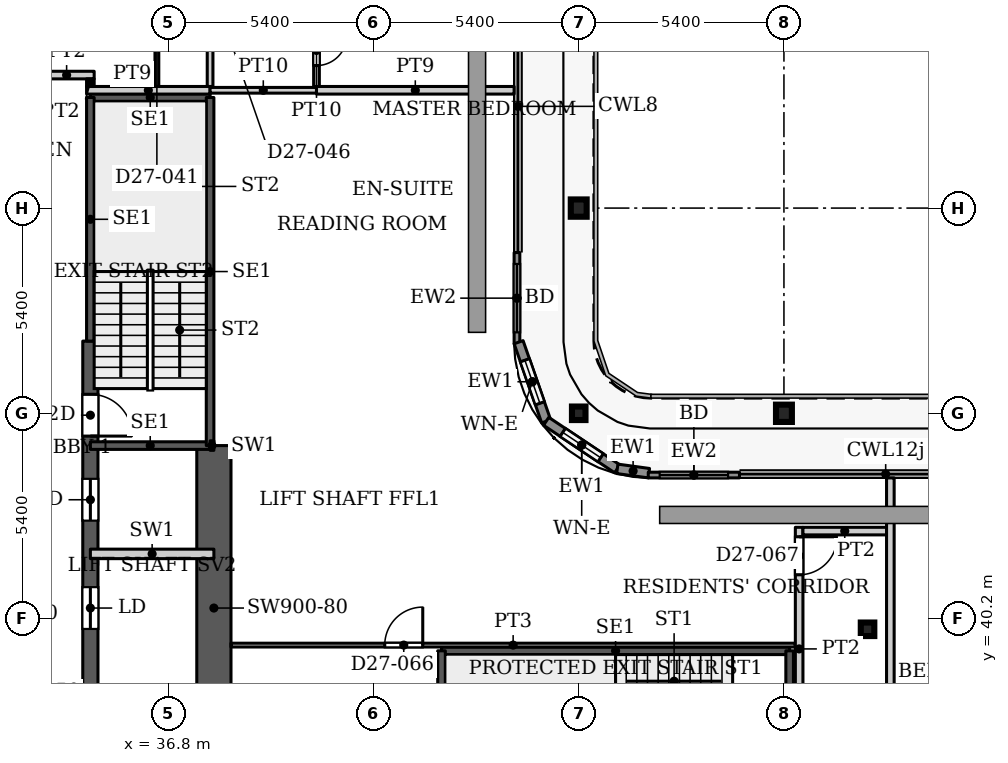
"""IFC4 building model, lengths in metres.
Left out: names, types, materials, properties, quantities, classifications, styles, units other than length and angle.
Written with IfcOpenShell. Run it as: python <this file> out.ifc"""

import sys

from ifc_helpers import new_model, si_unit, direction, frame, frame_2d, origin, origin_2d, place, context, subcontext, project, spatial, rectangle, hollow_rectangle, i_section, extrude, source, transform, mapped, element, fill, save


model = new_model("IFC4")
c1 = context("Model", 3, precision=1e-05, world=origin(), true_north=direction((0.0, 1.0)))
c2 = subcontext(c1, "Body", "Model", "MODEL_VIEW")
j1 = project(units=[si_unit("LENGTHUNIT", "METRE"), si_unit("PLANEANGLEUNIT", "RADIAN")], contexts=[c1])
p1 = place(None, origin())
s1 = spatial("IfcSite", under=j1, at=p1, CompositionType="ELEMENT")
p2 = place(p1, origin())
s2 = spatial("IfcBuilding", under=s1, at=p2, CompositionType="ELEMENT")
p3 = place(p2, frame((0.0, 0.0, 117.5)))
s3 = spatial("IfcBuildingStorey", under=s2, at=p3, CompositionType="ELEMENT", Elevation=117.5)
for number, where, z_axis, x_axis in (
    (1, (53.0, 45.6, 0.0), (0.0, 0.0, 1.0), (1.0, 0.0, 0.0)),
    (2, (47.6, 51.0, 0.0), (0.0, 0.0, 1.0), (1.0, 0.0, 0.0)),
):
    element("IfcColumn", number, at=place(p3, frame(where, z_axis=z_axis, x_axis=x_axis)), inside=s3, PredefinedType="COLUMN", context=c2, shape_type="SweptSolid", body=[
        extrude(i_section(OverallWidth=0.418, OverallDepth=0.455, WebThickness=0.042, FlangeThickness=0.068, FilletRadius=0.014, at=origin_2d()), origin(), (0.0, 0.0, 1.0), 3.9),
    ])
for number, where, z_axis, x_axis in (
    (3, (55.2, 39.916, 0.0), (0.0, 0.0, 1.0), (1.0, 0.0, 0.0)),
    (4, (47.6, 45.6, 0.0), (0.0, 0.0, 1.0), (1.0, 0.0, 0.0)),
):
    element("IfcColumn", number, at=place(p3, frame(where, z_axis=z_axis, x_axis=x_axis)), inside=s3, PredefinedType="COLUMN", context=c2, shape_type="SweptSolid", body=[
        extrude(hollow_rectangle(XDim=0.356, YDim=0.356, WallThickness=0.016, InnerFilletRadius=0.016, OuterFilletRadius=0.032, at=origin_2d()), origin(), (0.0, 0.0, 1.0), 3.9),
    ])
p4 = place(p3, frame((34.75, 29.05, 0.0), z_axis=(0.0, 0.0, 1.0), x_axis=(0.0, 1.0, 0.0)))
e5 = element("IfcWall", 5, at=p4, inside=s3, PredefinedType="SHEAR", context=c2, shape_type="SweptSolid", body=[
    extrude(rectangle(XDim=18.45, YDim=0.4, at=frame_2d((9.225, 0.0))), origin(), (0.0, 0.0, 1.0), 3.9),
])
p5 = place(p4, frame((8.025, 0.0, 0.0)))
e6 = element("IfcOpeningElement", 6, at=p5, cuts=e5, PredefinedType="OPENING", context=c2, shape_type="SweptSolid", body=[
    extrude(rectangle(XDim=1.1, YDim=2.2, at=frame_2d((0.55, 1.1))), frame((0.0, 0.21, 0.0), z_axis=(0.0, -1.0, 0.0), x_axis=(1.0, 0.0, 0.0)), (0.0, 0.0, 1.0), 0.42),
])
p6 = place(p4, frame((10.875, 0.0, 0.0)))
e7 = element("IfcOpeningElement", 7, at=p6, cuts=e5, PredefinedType="OPENING", context=c2, shape_type="SweptSolid", body=[
    extrude(rectangle(XDim=1.1, YDim=2.2, at=frame_2d((0.55, 1.1))), frame((0.0, 0.21, 0.0), z_axis=(0.0, -1.0, 0.0), x_axis=(1.0, 0.0, 0.0)), (0.0, 0.0, 1.0), 0.42),
])
p7 = place(p4, frame((13.725, 0.0, 0.0)))
e8 = element("IfcOpeningElement", 8, at=p7, cuts=e5, PredefinedType="OPENING", context=c2, shape_type="SweptSolid", body=[
    extrude(rectangle(XDim=1.1, YDim=2.2, at=frame_2d((0.55, 1.1))), frame((0.0, 0.21, 0.0), z_axis=(0.0, -1.0, 0.0), x_axis=(1.0, 0.0, 0.0)), (0.0, 0.0, 1.0), 0.42),
])
p8 = place(p4, frame((15.95, 0.0, 0.0)))
e9 = element("IfcOpeningElement", 9, at=p8, cuts=e5, PredefinedType="OPENING", context=c2, shape_type="SweptSolid", body=[
    extrude(rectangle(XDim=1.1, YDim=2.2, at=frame_2d((0.55, 1.1))), frame((0.0, 0.21, 0.0), z_axis=(0.0, -1.0, 0.0), x_axis=(1.0, 0.0, 0.0)), (0.0, 0.0, 1.0), 0.42),
])
p9 = place(p3, frame((38.0, 36.2, 0.0), z_axis=(0.0, 0.0, 1.0), x_axis=(0.0, 1.0, 0.0)))
e10 = element("IfcWall", 10, at=p9, inside=s3, PredefinedType="SHEAR", context=c2, shape_type="SweptSolid", body=[
    extrude(rectangle(XDim=8.55, YDim=0.9, at=frame_2d((4.275, 0.0))), origin(), (0.0, 0.0, 1.0), 3.9),
])
p10 = place(p3, frame((45.975, 49.83, 0.0), z_axis=(0.0, 0.0, 1.0), x_axis=(0.0, -1.0, 0.0)))
e11 = element("IfcWall", 11, at=p10, inside=s3, PredefinedType="SOLIDWALL", context=c2, shape_type="SweptSolid", body=[
    extrude(rectangle(XDim=2.4, YDim=0.15, at=frame_2d((1.2, 0.0))), origin(), (0.0, 0.0, 1.0), 3.75),
])
p11 = place(p10, frame((0.3, 0.0, 0.0)))
e12 = element("IfcOpeningElement", 12, at=p11, cuts=e11, PredefinedType="OPENING", context=c2, shape_type="SweptSolid", body=[
    extrude(rectangle(XDim=1.8, YDim=2.4, at=frame_2d((0.9, 1.2))), frame((0.0, 0.085, 0.0), z_axis=(0.0, -1.0, 0.0), x_axis=(1.0, 0.0, 0.0)), (0.0, 0.0, 1.0), 0.17),
])
p12 = place(p3, frame((46.018, 47.471, 0.0), z_axis=(0.0, 0.0, 1.0), x_axis=(0.328791208903, -0.944402637093, 0.0)))
e13 = element("IfcWall", 13, at=p12, inside=s3, PredefinedType="SOLIDWALL", context=c2, shape_type="SweptSolid", body=[
    extrude(rectangle(XDim=2.205, YDim=0.25, at=frame_2d((1.102, 0.0))), origin(), (0.0, 0.0, 1.0), 3.75),
])
p13 = place(p12, frame((0.503, 0.0, 0.6)))
e14 = element("IfcOpeningElement", 14, at=p13, cuts=e13, PredefinedType="OPENING", context=c2, shape_type="SweptSolid", body=[
    extrude(rectangle(XDim=1.2, YDim=2.1, at=frame_2d((0.6, 1.05))), frame((0.0, 0.135, 0.0), z_axis=(0.0, -1.0, 0.0), x_axis=(1.0, 0.0, 0.0)), (0.0, 0.0, 1.0), 0.27),
])
p14 = place(p3, frame((46.743, 45.389, 0.0), z_axis=(0.0, 0.0, 1.0), x_axis=(0.831449265529, -0.555600682912, 0.0)))
e15 = element("IfcWall", 15, at=p14, inside=s3, PredefinedType="SOLIDWALL", context=c2, shape_type="SweptSolid", body=[
    extrude(rectangle(XDim=2.251, YDim=0.25, at=frame_2d((1.126, 0.0))), origin(), (0.0, 0.0, 1.0), 3.75),
])
p15 = place(p14, frame((0.525, 0.0, 0.6)))
e16 = element("IfcOpeningElement", 16, at=p15, cuts=e15, PredefinedType="OPENING", context=c2, shape_type="SweptSolid", body=[
    extrude(rectangle(XDim=1.2, YDim=2.1, at=frame_2d((0.6, 1.05))), frame((0.0, 0.135, 0.0), z_axis=(0.0, -1.0, 0.0), x_axis=(1.0, 0.0, 0.0)), (0.0, 0.0, 1.0), 0.27),
])
p16 = place(p3, frame((48.615, 44.138, 0.0), z_axis=(0.0, 0.0, 1.0), x_axis=(0.990741504246, -0.135761819977, 0.0)))
e17 = element("IfcWall", 17, at=p16, inside=s3, PredefinedType="SOLIDWALL", context=c2, shape_type="SweptSolid", body=[
    extrude(rectangle(XDim=0.84, YDim=0.25, at=frame_2d((0.42, 0.0))), origin(), (0.0, 0.0, 1.0), 3.75),
])
p17 = place(p3, frame((49.43, 43.975, 0.0), z_axis=(0.0, 0.0, 1.0), x_axis=(1.0, 0.0, 0.0)))
e18 = element("IfcWall", 18, at=p17, inside=s3, PredefinedType="SOLIDWALL", context=c2, shape_type="SweptSolid", body=[
    extrude(rectangle(XDim=2.4, YDim=0.15, at=frame_2d((1.2, 0.0))), origin(), (0.0, 0.0, 1.0), 3.75),
])
p18 = place(p17, frame((0.3, 0.0, 0.0)))
e19 = element("IfcOpeningElement", 19, at=p18, cuts=e18, PredefinedType="OPENING", context=c2, shape_type="SweptSolid", body=[
    extrude(rectangle(XDim=1.8, YDim=2.4, at=frame_2d((0.9, 1.2))), frame((0.0, 0.085, 0.0), z_axis=(0.0, -1.0, 0.0), x_axis=(1.0, 0.0, 0.0)), (0.0, 0.0, 1.0), 0.17),
])
p19 = place(p3, frame((43.99, 39.35, 0.0), z_axis=(0.0, 0.0, 1.0), x_axis=(1.0, 0.0, 0.0)))
e20 = element("IfcWall", 20, at=p19, inside=s3, PredefinedType="SHEAR", context=c2, shape_type="SweptSolid", body=[
    extrude(rectangle(XDim=9.16, YDim=0.2, at=frame_2d((4.58, 0.0))), origin(), (0.0, 0.0, 1.0), 3.9),
])
for number, where, z_axis, x_axis in (
    (21, (43.99, 36.2, 0.0), (0.0, 0.0, 1.0), (0.0, 1.0, 0.0)),
    (22, (53.15, 36.2, 0.0), (0.0, 0.0, 1.0), (0.0, 1.0, 0.0)),
):
    element("IfcWall", number, at=place(p3, frame(where, z_axis=z_axis, x_axis=x_axis)), inside=s3, PredefinedType="SHEAR", context=c2, shape_type="SweptSolid", body=[
        extrude(rectangle(XDim=3.15, YDim=0.2, at=frame_2d((1.575, 0.0))), origin(), (0.0, 0.0, 1.0), 3.9),
    ])
for number, where, z_axis, x_axis in (
    (23, (34.75, 44.75, 0.0), (0.0, 0.0, 1.0), (1.0, 0.0, 0.0)),
    (24, (34.75, 53.91, 0.0), (0.0, 0.0, 1.0), (1.0, 0.0, 0.0)),
):
    element("IfcWall", number, at=place(p3, frame(where, z_axis=z_axis, x_axis=x_axis)), inside=s3, PredefinedType="SHEAR", context=c2, shape_type="SweptSolid", body=[
        extrude(rectangle(XDim=3.15, YDim=0.2, at=frame_2d((1.575, 0.0))), origin(), (0.0, 0.0, 1.0), 3.9),
    ])
p20 = place(p3, frame((34.75, 47.5, 0.0), z_axis=(0.0, 0.0, 1.0), x_axis=(0.0, 1.0, 0.0)))
e25 = element("IfcWall", 25, at=p20, inside=s3, PredefinedType="SHEAR", context=c2, shape_type="SweptSolid", body=[
    extrude(rectangle(XDim=6.41, YDim=0.2, at=frame_2d((3.205, 0.0))), origin(), (0.0, 0.0, 1.0), 3.9),
])
p21 = place(p3, frame((37.9, 44.75, 0.0), z_axis=(0.0, 0.0, 1.0), x_axis=(0.0, 1.0, 0.0)))
e26 = element("IfcWall", 26, at=p21, inside=s3, PredefinedType="SHEAR", context=c2, shape_type="SweptSolid", body=[
    extrude(rectangle(XDim=9.16, YDim=0.2, at=frame_2d((4.58, 0.0))), origin(), (0.0, 0.0, 1.0), 3.9),
])
p22 = place(p3, frame((34.75, 41.9, 0.0), z_axis=(0.0, 0.0, 1.0), x_axis=(1.0, 0.0, 0.0)))
e27 = element("IfcWall", 27, at=p22, inside=s3, PredefinedType="PARTITIONING", context=c2, shape_type="SweptSolid", body=[
    extrude(rectangle(XDim=3.25, YDim=0.25, at=frame_2d((1.625, 0.0))), origin(), (0.0, 0.0, 1.0), 3.9),
])
p23 = place(p3, frame((37.9, 44.75, 0.0), z_axis=(0.0, 0.0, 1.0), x_axis=(1.0, 0.0, 0.0)))
e28 = element("IfcWall", 28, at=p23, inside=s3, PredefinedType="PARTITIONING", context=c2, shape_type="SweptSolid", body=[
    extrude(rectangle(XDim=0.1, YDim=0.25, at=frame_2d((0.05, 0.0))), origin(), (0.0, 0.0, 1.0), 3.9),
])
p24 = place(p3, frame((33.4, 54.5, 0.0), z_axis=(0.0, 0.0, 1.0), x_axis=(1.0, 0.0, 0.0)))
e29 = element("IfcWall", 29, at=p24, inside=s3, PredefinedType="PARTITIONING", context=c2, shape_type="SweptSolid", body=[
    extrude(rectangle(XDim=1.45, YDim=0.2, at=frame_2d((0.725, 0.0))), origin(), (0.0, 0.0, 1.0), 3.6),
])
p25 = place(p3, frame((34.65, 54.1, 0.0), z_axis=(0.0, 0.0, 1.0), x_axis=(1.0, 0.0, 0.0)))
e30 = element("IfcWall", 30, at=p25, inside=s3, PredefinedType="PARTITIONING", context=c2, shape_type="SweptSolid", body=[
    extrude(rectangle(XDim=3.25, YDim=0.2, at=frame_2d((1.625, 0.0))), origin(), (0.0, 0.0, 1.0), 3.6),
])
p26 = place(p3, frame((34.75, 54.2, 0.0), z_axis=(0.0, 0.0, 1.0), x_axis=(0.0, 1.0, 0.0)))
e31 = element("IfcWall", 31, at=p26, inside=s3, PredefinedType="PARTITIONING", context=c2, shape_type="SweptSolid", body=[
    extrude(rectangle(XDim=0.2, YDim=0.2, at=frame_2d((0.1, 0.0))), origin(), (0.0, 0.0, 1.0), 3.6),
])
p27 = place(p3, frame((36.5, 54.2, 0.0), z_axis=(0.0, 0.0, 1.0), x_axis=(0.0, 1.0, 0.0)))
e32 = element("IfcWall", 32, at=p27, inside=s3, PredefinedType="PARTITIONING", context=c2, shape_type="SweptSolid", body=[
    extrude(rectangle(XDim=2.85, YDim=0.1, at=frame_2d((1.425, 0.0))), origin(), (0.0, 0.0, 1.0), 3.6),
])
p28 = place(p27, frame((0.95, 0.0, 0.0)))
e33 = element("IfcOpeningElement", 33, at=p28, cuts=e32, PredefinedType="OPENING", context=c2, shape_type="SweptSolid", body=[
    extrude(rectangle(XDim=0.9, YDim=2.1, at=frame_2d((0.45, 1.05))), frame((0.0, 0.06, 0.0), z_axis=(0.0, -1.0, 0.0), x_axis=(1.0, 0.0, 0.0)), (0.0, 0.0, 1.0), 0.12),
])
p29 = place(p3, frame((37.9, 54.1, 0.0), z_axis=(0.0, 0.0, 1.0), x_axis=(1.0, 0.0, 0.0)))
e34 = element("IfcWall", 34, at=p29, inside=s3, PredefinedType="PARTITIONING", context=c2, shape_type="SweptSolid", body=[
    extrude(rectangle(XDim=2.8, YDim=0.15, at=frame_2d((1.4, 0.0))), origin(), (0.0, 0.0, 1.0), 3.6),
])
p30 = place(p3, frame((37.9, 54.2, 0.0), z_axis=(0.0, 0.0, 1.0), x_axis=(0.0, 1.0, 0.0)))
e35 = element("IfcWall", 35, at=p30, inside=s3, PredefinedType="PARTITIONING", context=c2, shape_type="SweptSolid", body=[
    extrude(rectangle(XDim=14.2, YDim=0.15, at=frame_2d((7.1, 0.0))), origin(), (0.0, 0.0, 1.0), 3.6),
])
p31 = place(p30, frame((4.4, 0.0, 0.0)))
e36 = element("IfcOpeningElement", 36, at=p31, cuts=e35, PredefinedType="OPENING", context=c2, shape_type="SweptSolid", body=[
    extrude(rectangle(XDim=0.9, YDim=2.1, at=frame_2d((0.45, 1.05))), frame((0.0, 0.085, 0.0), z_axis=(0.0, -1.0, 0.0), x_axis=(1.0, 0.0, 0.0)), (0.0, 0.0, 1.0), 0.17),
])
p32 = place(p30, frame((9.5, 0.0, 0.0)))
e37 = element("IfcOpeningElement", 37, at=p32, cuts=e35, PredefinedType="OPENING", context=c2, shape_type="SweptSolid", body=[
    extrude(rectangle(XDim=0.9, YDim=2.1, at=frame_2d((0.45, 1.05))), frame((0.0, 0.085, 0.0), z_axis=(0.0, -1.0, 0.0), x_axis=(1.0, 0.0, 0.0)), (0.0, 0.0, 1.0), 0.17),
])
p33 = place(p30, frame((12.3, 0.0, 0.0)))
e38 = element("IfcOpeningElement", 38, at=p33, cuts=e35, PredefinedType="OPENING", context=c2, shape_type="SweptSolid", body=[
    extrude(rectangle(XDim=1.0, YDim=2.1, at=frame_2d((0.5, 1.05))), frame((0.0, 0.085, 0.0), z_axis=(0.0, -1.0, 0.0), x_axis=(1.0, 0.0, 0.0)), (0.0, 0.0, 1.0), 0.17),
])
p34 = place(p30, frame((6.95, 0.0, 0.0)))
e39 = element("IfcOpeningElement", 39, at=p34, cuts=e35, PredefinedType="OPENING", context=c2, shape_type="SweptSolid", body=[
    extrude(rectangle(XDim=0.9, YDim=2.1, at=frame_2d((0.45, 1.05))), frame((0.0, 0.085, 0.0), z_axis=(0.0, -1.0, 0.0), x_axis=(1.0, 0.0, 0.0)), (0.0, 0.0, 1.0), 0.17),
])
p35 = place(p30, frame((2.3, 0.0, 0.0)))
e40 = element("IfcOpeningElement", 40, at=p35, cuts=e35, PredefinedType="OPENING", context=c2, shape_type="SweptSolid", body=[
    extrude(rectangle(XDim=0.9, YDim=2.1, at=frame_2d((0.45, 1.05))), frame((0.0, 0.085, 0.0), z_axis=(0.0, -1.0, 0.0), x_axis=(1.0, 0.0, 0.0)), (0.0, 0.0, 1.0), 0.17),
])
p36 = place(p3, frame((38.449, 39.5, 0.0), z_axis=(0.0, 0.0, 1.0), x_axis=(1.0, 0.0, 0.0)))
e41 = element("IfcWall", 41, at=p36, inside=s3, PredefinedType="PARTITIONING", context=c2, shape_type="SweptSolid", body=[
    extrude(rectangle(XDim=14.851, YDim=0.1, at=frame_2d((7.426, 0.0))), origin(), (0.0, 0.0, 1.0), 3.6),
])
p37 = place(p36, frame((4.047, 0.0, 0.0)))
e42 = element("IfcOpeningElement", 42, at=p37, cuts=e41, PredefinedType="OPENING", context=c2, shape_type="SweptSolid", body=[
    extrude(rectangle(XDim=1.0, YDim=2.1, at=frame_2d((0.5, 1.05))), frame((0.0, 0.06, 0.0), z_axis=(0.0, -1.0, 0.0), x_axis=(1.0, 0.0, 0.0)), (0.0, 0.0, 1.0), 0.12),
])
p38 = place(p3, frame((40.7, 54.1, 0.0), z_axis=(0.0, 0.0, 1.0), x_axis=(1.0, 0.0, 0.0)))
e43 = element("IfcWall", 43, at=p38, inside=s3, PredefinedType="PARTITIONING", context=c2, shape_type="SweptSolid", body=[
    extrude(rectangle(XDim=5.2, YDim=0.2, at=frame_2d((2.6, 0.0))), origin(), (0.0, 0.0, 1.0), 3.6),
])
p39 = place(p3, frame((40.7, 54.2, 0.0), z_axis=(0.0, 0.0, 1.0), x_axis=(0.0, 1.0, 0.0)))
e44 = element("IfcWall", 44, at=p39, inside=s3, PredefinedType="PARTITIONING", context=c2, shape_type="SweptSolid", body=[
    extrude(rectangle(XDim=1.925, YDim=0.15, at=frame_2d((0.962, 0.0))), origin(), (0.0, 0.0, 1.0), 3.6),
])
p40 = place(p39, frame((0.55, 0.0, 0.0)))
e45 = element("IfcOpeningElement", 45, at=p40, cuts=e44, PredefinedType="OPENING", context=c2, shape_type="SweptSolid", body=[
    extrude(rectangle(XDim=0.8, YDim=2.1, at=frame_2d((0.4, 1.05))), frame((0.0, 0.085, 0.0), z_axis=(0.0, -1.0, 0.0), x_axis=(1.0, 0.0, 0.0)), (0.0, 0.0, 1.0), 0.17),
])
p41 = place(p3, frame((53.4, 36.199, 0.0), z_axis=(0.0, 0.0, 1.0), x_axis=(0.0, 1.0, 0.0)))
e46 = element("IfcWall", 46, at=p41, inside=s3, PredefinedType="PARTITIONING", context=c2, shape_type="SweptSolid", body=[
    extrude(rectangle(XDim=6.401, YDim=0.2, at=frame_2d((3.201, 0.0))), origin(), (0.0, 0.0, 1.0), 3.6),
])
p42 = place(p41, frame((5.151, 0.0, 0.0)))
e47 = element("IfcOpeningElement", 47, at=p42, cuts=e46, PredefinedType="OPENING", context=c2, shape_type="SweptSolid", body=[
    extrude(rectangle(XDim=1.0, YDim=2.1, at=frame_2d((0.5, 1.05))), frame((0.0, 0.11, 0.0), z_axis=(0.0, -1.0, 0.0), x_axis=(1.0, 0.0, 0.0)), (0.0, 0.0, 1.0), 0.22),
])
p43 = place(p3, frame((53.5, 42.5, 0.0), z_axis=(0.0, 0.0, 1.0), x_axis=(1.0, 0.0, 0.0)))
e48 = element("IfcWall", 48, at=p43, inside=s3, PredefinedType="PARTITIONING", context=c2, shape_type="SweptSolid", body=[
    extrude(rectangle(XDim=2.2, YDim=0.2, at=frame_2d((1.1, 0.0))), origin(), (0.0, 0.0, 1.0), 3.6),
])
p44 = place(p3, frame((55.8, 30.4, 0.0), z_axis=(0.0, 0.0, 1.0), x_axis=(0.0, 1.0, 0.0)))
e49 = element("IfcWall", 49, at=p44, inside=s3, PredefinedType="PARTITIONING", context=c2, shape_type="SweptSolid", body=[
    extrude(rectangle(XDim=13.5, YDim=0.2, at=frame_2d((6.75, 0.0))), origin(), (0.0, 0.0, 1.0), 3.6),
])
m1 = source(origin(), c2, "Body", "SweptSolid", [
    extrude(rectangle(XDim=1.8, YDim=2.4, at=frame_2d((0.9, 1.2))), frame((0.0, 0.025, 0.0), z_axis=(0.0, -1.0, 0.0), x_axis=(1.0, 0.0, 0.0)), (0.0, 0.0, 1.0), 0.05),
])
p45 = place(p11, origin())
e50 = element("IfcDoor", 50, at=p45, inside=s3, OperationType="SLIDING_TO_LEFT", PredefinedType="DOOR", context=c2, shape_type="MappedRepresentation", body=[
    mapped(m1, transform((0.0, 0.0, 0.0), x_axis=(1.0, 0.0, 0.0), y_axis=(0.0, 1.0, 0.0), z_axis=(0.0, 0.0, 1.0), scale=1.0)),
])
fill(e12, e50)
m2 = source(origin(), c2, "Body", "SweptSolid", [
    extrude(rectangle(XDim=1.2, YDim=2.1, at=frame_2d((0.6, 1.05))), frame((0.0, 0.03, 0.0), z_axis=(0.0, -1.0, 0.0), x_axis=(1.0, 0.0, 0.0)), (0.0, 0.0, 1.0), 0.06),
])
p46 = place(p13, origin())
e51 = element("IfcWindow", 51, at=p46, inside=s3, PartitioningType="SINGLE_PANEL", PredefinedType="WINDOW", context=c2, shape_type="MappedRepresentation", body=[
    mapped(m2, transform((0.0, 0.0, 0.0), x_axis=(1.0, 0.0, 0.0), y_axis=(0.0, 1.0, 0.0), z_axis=(0.0, 0.0, 1.0), scale=1.0)),
])
fill(e14, e51)
p47 = place(p15, origin())
e52 = element("IfcWindow", 52, at=p47, inside=s3, PartitioningType="SINGLE_PANEL", PredefinedType="WINDOW", context=c2, shape_type="MappedRepresentation", body=[
    mapped(m2, transform((0.0, 0.0, 0.0), x_axis=(1.0, 0.0, 0.0), y_axis=(0.0, 1.0, 0.0), z_axis=(0.0, 0.0, 1.0), scale=1.0)),
])
fill(e16, e52)
p48 = place(p18, origin())
e53 = element("IfcDoor", 53, at=p48, inside=s3, OperationType="SLIDING_TO_LEFT", PredefinedType="DOOR", context=c2, shape_type="MappedRepresentation", body=[
    mapped(m1, transform((0.0, 0.0, 0.0), x_axis=(1.0, 0.0, 0.0), y_axis=(0.0, 1.0, 0.0), z_axis=(0.0, 0.0, 1.0), scale=1.0)),
])
fill(e19, e53)
m3 = source(origin(), c2, "Body", "SweptSolid", [
    extrude(rectangle(XDim=1.1, YDim=2.2, at=frame_2d((0.55, 1.1))), frame((0.0, 0.025, 0.0), z_axis=(0.0, -1.0, 0.0), x_axis=(1.0, 0.0, 0.0)), (0.0, 0.0, 1.0), 0.05),
])
p49 = place(p6, origin())
e54 = element("IfcDoor", 54, at=p49, inside=s3, OperationType="SLIDING_TO_LEFT", PredefinedType="DOOR", context=c2, shape_type="MappedRepresentation", body=[
    mapped(m3, transform((0.0, 0.0, 0.0), x_axis=(1.0, 0.0, 0.0), y_axis=(0.0, 1.0, 0.0), z_axis=(0.0, 0.0, 1.0), scale=1.0)),
])
fill(e7, e54)
p50 = place(p7, origin())
e55 = element("IfcDoor", 55, at=p50, inside=s3, OperationType="SLIDING_TO_LEFT", PredefinedType="DOOR", context=c2, shape_type="MappedRepresentation", body=[
    mapped(m3, transform((0.0, 0.0, 0.0), x_axis=(1.0, 0.0, 0.0), y_axis=(0.0, 1.0, 0.0), z_axis=(0.0, 0.0, 1.0), scale=1.0)),
])
fill(e8, e55)
m4 = source(origin(), c2, "Body", "SweptSolid", [
    extrude(rectangle(XDim=1.1, YDim=2.2, at=frame_2d((0.55, 1.1))), frame((0.0, 0.025, 0.0), z_axis=(0.0, -1.0, 0.0), x_axis=(1.0, 0.0, 0.0)), (0.0, 0.0, 1.0), 0.05),
])
p51 = place(p8, origin())
e56 = element("IfcDoor", 56, at=p51, inside=s3, OperationType="SINGLE_SWING_RIGHT", PredefinedType="DOOR", context=c2, shape_type="MappedRepresentation", body=[
    mapped(m4, transform((0.0, 0.0, 0.0), x_axis=(1.0, 0.0, 0.0), y_axis=(0.0, 1.0, 0.0), z_axis=(0.0, 0.0, 1.0), scale=1.0)),
])
fill(e9, e56)
m5 = source(origin(), c2, "Body", "SweptSolid", [
    extrude(rectangle(XDim=0.8, YDim=2.1, at=frame_2d((0.4, 1.05))), frame((0.0, 0.025, 0.0), z_axis=(0.0, -1.0, 0.0), x_axis=(1.0, 0.0, 0.0)), (0.0, 0.0, 1.0), 0.05),
])
p52 = place(p40, origin())
e57 = element("IfcDoor", 57, at=p52, inside=s3, OperationType="SINGLE_SWING_RIGHT", PredefinedType="DOOR", context=c2, shape_type="MappedRepresentation", body=[
    mapped(m5, transform((0.0, 0.0, 0.0), x_axis=(1.0, 0.0, 0.0), y_axis=(0.0, 1.0, 0.0), z_axis=(0.0, 0.0, 1.0), scale=1.0)),
])
fill(e45, e57)
m6 = source(origin(), c2, "Body", "SweptSolid", [
    extrude(rectangle(XDim=1.0, YDim=2.1, at=frame_2d((0.5, 1.05))), frame((0.0, 0.025, 0.0), z_axis=(0.0, -1.0, 0.0), x_axis=(1.0, 0.0, 0.0)), (0.0, 0.0, 1.0), 0.05),
])
p53 = place(p37, origin())
e58 = element("IfcDoor", 58, at=p53, inside=s3, OperationType="SINGLE_SWING_LEFT", PredefinedType="DOOR", context=c2, shape_type="MappedRepresentation", body=[
    mapped(m6, transform((0.0, 0.0, 0.0), x_axis=(1.0, 0.0, 0.0), y_axis=(0.0, 1.0, 0.0), z_axis=(0.0, 0.0, 1.0), scale=1.0)),
])
fill(e42, e58)
m7 = source(origin(), c2, "Body", "SweptSolid", [
    extrude(rectangle(XDim=1.0, YDim=2.1, at=frame_2d((0.5, 1.05))), frame((0.0, 0.025, 0.0), z_axis=(0.0, -1.0, 0.0), x_axis=(1.0, 0.0, 0.0)), (0.0, 0.0, 1.0), 0.05),
])
p54 = place(p42, origin())
e59 = element("IfcDoor", 59, at=p54, inside=s3, OperationType="SINGLE_SWING_RIGHT", PredefinedType="DOOR", context=c2, shape_type="MappedRepresentation", body=[
    mapped(m7, transform((0.0, 0.0, 0.0), x_axis=(1.0, 0.0, 0.0), y_axis=(0.0, 1.0, 0.0), z_axis=(0.0, 0.0, 1.0), scale=1.0)),
])
fill(e47, e59)
save(model, sys.argv[1])
